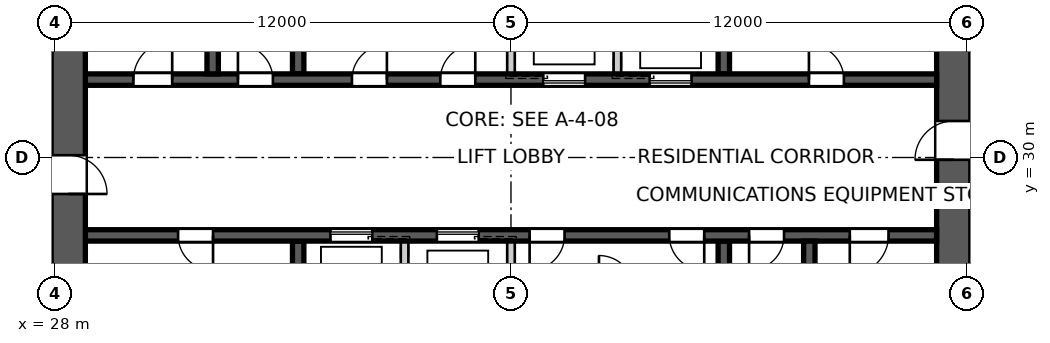
"""IFC4 building model, lengths in metres.
Left out: names, types, materials, properties, quantities, classifications, styles, units other than length and angle.
Written with IfcOpenShell. Run it as: python <this file> out.ifc"""

import sys

from ifc_helpers import new_model, si_unit, direction, frame, frame_2d, origin, place, context, subcontext, project, spatial, polyline, rectangle, outline, extrude, element, fill, save


model = new_model("IFC4")
c1 = context("Model", 3, precision=1e-05, world=origin(), true_north=direction((0.0, 1.0)))
c2 = subcontext(c1, "Body", "Model", "MODEL_VIEW")
j1 = project(units=[si_unit("LENGTHUNIT", "METRE"), si_unit("PLANEANGLEUNIT", "RADIAN")], contexts=[c1])
p1 = place(None, origin())
s1 = spatial("IfcSite", under=j1, at=p1, CompositionType="ELEMENT")
p2 = place(p1, origin())
s2 = spatial("IfcBuilding", under=s1, at=p2, CompositionType="ELEMENT")
p3 = place(p2, frame((0.0, 0.0, 247.2)))
s3 = spatial("IfcBuildingStorey", under=s2, at=p3, CompositionType="ELEMENT", Elevation=247.2)
p4 = place(p3, frame((51.65, 18.8, 0.0), z_axis=(0.0, 0.0, 1.0), x_axis=(0.0, 1.0, 0.0)))
e1 = element("IfcWall", 1, at=p4, inside=s3, PredefinedType="SHEAR", context=c2, shape_type="SweptSolid", body=[
    extrude(outline(polyline([(0.0, -0.45), (22.4, -0.45), (22.4, -0.025), (22.85, -0.025), (22.85, 0.025), (22.4, 0.025), (22.4, 0.45), (0.0, 0.45), (0.0, 0.025), (-0.45, 0.025), (-0.45, -0.025), (0.0, -0.025), (0.0, -0.45)])), origin(), (0.0, 0.0, 1.0), 3.4),
])
p5 = place(p4, frame((11.14, 0.0, 0.0)))
e2 = element("IfcOpeningElement", 2, at=p5, cuts=e1, PredefinedType="OPENING", context=c2, shape_type="SweptSolid", body=[
    extrude(rectangle(XDim=1.02, YDim=2.4, at=frame_2d((0.51, 1.2))), frame((0.0, 0.46, 0.0), z_axis=(0.0, -1.0, 0.0), x_axis=(1.0, 0.0, 0.0)), (0.0, 0.0, 1.0), 0.92),
])
p6 = place(p3, frame((28.35, 41.2, 0.0), z_axis=(0.0, 0.0, 1.0), x_axis=(0.0, -1.0, 0.0)))
e3 = element("IfcWall", 3, at=p6, inside=s3, PredefinedType="SHEAR", context=c2, shape_type="SweptSolid", body=[
    extrude(outline(polyline([(0.0, -0.45), (22.4, -0.45), (22.4, -0.025), (22.85, -0.025), (22.85, 0.025), (22.4, 0.025), (22.4, 0.45), (0.0, 0.45), (0.0, 0.025), (-0.45, 0.025), (-0.45, -0.025), (0.0, -0.025), (0.0, -0.45)])), origin(), (0.0, 0.0, 1.0), 3.4),
])
p7 = place(p6, frame((11.14, 0.0, 0.0)))
e4 = element("IfcOpeningElement", 4, at=p7, cuts=e3, PredefinedType="OPENING", context=c2, shape_type="SweptSolid", body=[
    extrude(rectangle(XDim=1.02, YDim=2.4, at=frame_2d((0.51, 1.2))), frame((0.0, 0.46, 0.0), z_axis=(0.0, -1.0, 0.0), x_axis=(1.0, 0.0, 0.0)), (0.0, 0.0, 1.0), 0.92),
])
p8 = place(p3, frame((28.8, 32.05, 0.0), z_axis=(0.0, 0.0, 1.0), x_axis=(1.0, 0.0, 0.0)))
e5 = element("IfcWall", 5, at=p8, inside=s3, PredefinedType="SHEAR", context=c2, shape_type="SweptSolid", body=[
    extrude(rectangle(XDim=22.4, YDim=0.3, at=frame_2d((11.2, 0.0))), origin(), (0.0, 0.0, 1.0), 3.4),
])
p9 = place(p8, frame((19.04, 0.0, 0.0)))
e6 = element("IfcOpeningElement", 6, at=p9, cuts=e5, PredefinedType="OPENING", context=c2, shape_type="SweptSolid", body=[
    extrude(rectangle(XDim=0.92, YDim=2.1, at=frame_2d((0.46, 1.05))), frame((0.0, 0.16, 0.0), z_axis=(0.0, -1.0, 0.0), x_axis=(1.0, 0.0, 0.0)), (0.0, 0.0, 1.0), 0.32),
])
p10 = place(p8, frame((1.265, 0.0, 0.0)))
e7 = element("IfcOpeningElement", 7, at=p10, cuts=e5, PredefinedType="OPENING", context=c2, shape_type="SweptSolid", body=[
    extrude(rectangle(XDim=1.02, YDim=2.1, at=frame_2d((0.51, 1.05))), frame((0.0, 0.16, 0.0), z_axis=(0.0, -1.0, 0.0), x_axis=(1.0, 0.0, 0.0)), (0.0, 0.0, 1.0), 0.32),
])
p11 = place(p8, frame((4.015, 0.0, 0.0)))
e8 = element("IfcOpeningElement", 8, at=p11, cuts=e5, PredefinedType="OPENING", context=c2, shape_type="SweptSolid", body=[
    extrude(rectangle(XDim=0.92, YDim=2.1, at=frame_2d((0.46, 1.05))), frame((0.0, 0.16, 0.0), z_axis=(0.0, -1.0, 0.0), x_axis=(1.0, 0.0, 0.0)), (0.0, 0.0, 1.0), 0.32),
])
p12 = place(p8, frame((7.015, 0.0, 0.0)))
e9 = element("IfcOpeningElement", 9, at=p12, cuts=e5, PredefinedType="OPENING", context=c2, shape_type="SweptSolid", body=[
    extrude(rectangle(XDim=0.92, YDim=2.1, at=frame_2d((0.46, 1.05))), frame((0.0, 0.16, 0.0), z_axis=(0.0, -1.0, 0.0), x_axis=(1.0, 0.0, 0.0)), (0.0, 0.0, 1.0), 0.32),
])
p13 = place(p8, frame((9.34, 0.0, 0.0)))
e10 = element("IfcOpeningElement", 10, at=p13, cuts=e5, PredefinedType="OPENING", context=c2, shape_type="SweptSolid", body=[
    extrude(rectangle(XDim=0.92, YDim=2.1, at=frame_2d((0.46, 1.05))), frame((0.0, 0.16, 0.0), z_axis=(0.0, -1.0, 0.0), x_axis=(1.0, 0.0, 0.0)), (0.0, 0.0, 1.0), 0.32),
])
p14 = place(p8, frame((12.05, 0.0, 0.0)))
e11 = element("IfcOpeningElement", 11, at=p14, cuts=e5, PredefinedType="OPENING", context=c2, shape_type="SweptSolid", body=[
    extrude(rectangle(XDim=1.1, YDim=2.1, at=frame_2d((0.55, 1.05))), frame((0.0, 0.16, 0.0), z_axis=(0.0, -1.0, 0.0), x_axis=(1.0, 0.0, 0.0)), (0.0, 0.0, 1.0), 0.32),
])
p15 = place(p8, frame((14.85, 0.0, 0.0)))
e12 = element("IfcOpeningElement", 12, at=p15, cuts=e5, PredefinedType="OPENING", context=c2, shape_type="SweptSolid", body=[
    extrude(rectangle(XDim=1.1, YDim=2.1, at=frame_2d((0.55, 1.05))), frame((0.0, 0.16, 0.0), z_axis=(0.0, -1.0, 0.0), x_axis=(1.0, 0.0, 0.0)), (0.0, 0.0, 1.0), 0.32),
])
p16 = place(p3, frame((51.2, 27.95, 0.0), z_axis=(0.0, 0.0, 1.0), x_axis=(-1.0, 0.0, 0.0)))
e13 = element("IfcWall", 13, at=p16, inside=s3, PredefinedType="SHEAR", context=c2, shape_type="SweptSolid", body=[
    extrude(rectangle(XDim=22.4, YDim=0.3, at=frame_2d((11.2, 0.0))), origin(), (0.0, 0.0, 1.0), 3.4),
])
p17 = place(p16, frame((19.04, 0.0, 0.0)))
e14 = element("IfcOpeningElement", 14, at=p17, cuts=e13, PredefinedType="OPENING", context=c2, shape_type="SweptSolid", body=[
    extrude(rectangle(XDim=0.92, YDim=2.1, at=frame_2d((0.46, 1.05))), frame((0.0, 0.16, 0.0), z_axis=(0.0, -1.0, 0.0), x_axis=(1.0, 0.0, 0.0)), (0.0, 0.0, 1.0), 0.32),
])
p18 = place(p16, frame((1.265, 0.0, 0.0)))
e15 = element("IfcOpeningElement", 15, at=p18, cuts=e13, PredefinedType="OPENING", context=c2, shape_type="SweptSolid", body=[
    extrude(rectangle(XDim=1.02, YDim=2.1, at=frame_2d((0.51, 1.05))), frame((0.0, 0.16, 0.0), z_axis=(0.0, -1.0, 0.0), x_axis=(1.0, 0.0, 0.0)), (0.0, 0.0, 1.0), 0.32),
])
p19 = place(p16, frame((4.015, 0.0, 0.0)))
e16 = element("IfcOpeningElement", 16, at=p19, cuts=e13, PredefinedType="OPENING", context=c2, shape_type="SweptSolid", body=[
    extrude(rectangle(XDim=0.92, YDim=2.1, at=frame_2d((0.46, 1.05))), frame((0.0, 0.16, 0.0), z_axis=(0.0, -1.0, 0.0), x_axis=(1.0, 0.0, 0.0)), (0.0, 0.0, 1.0), 0.32),
])
p20 = place(p16, frame((9.79, 0.0, 0.0)))
e17 = element("IfcOpeningElement", 17, at=p20, cuts=e13, PredefinedType="OPENING", context=c2, shape_type="SweptSolid", body=[
    extrude(rectangle(XDim=0.92, YDim=2.1, at=frame_2d((0.46, 1.05))), frame((0.0, 0.16, 0.0), z_axis=(0.0, -1.0, 0.0), x_axis=(1.0, 0.0, 0.0)), (0.0, 0.0, 1.0), 0.32),
])
p21 = place(p16, frame((6.115, 0.0, 0.0)))
e18 = element("IfcOpeningElement", 18, at=p21, cuts=e13, PredefinedType="OPENING", context=c2, shape_type="SweptSolid", body=[
    extrude(rectangle(XDim=0.92, YDim=2.1, at=frame_2d((0.46, 1.05))), frame((0.0, 0.16, 0.0), z_axis=(0.0, -1.0, 0.0), x_axis=(1.0, 0.0, 0.0)), (0.0, 0.0, 1.0), 0.32),
])
p22 = place(p16, frame((12.05, 0.0, 0.0)))
e19 = element("IfcOpeningElement", 19, at=p22, cuts=e13, PredefinedType="OPENING", context=c2, shape_type="SweptSolid", body=[
    extrude(rectangle(XDim=1.1, YDim=2.1, at=frame_2d((0.55, 1.05))), frame((0.0, 0.16, 0.0), z_axis=(0.0, -1.0, 0.0), x_axis=(1.0, 0.0, 0.0)), (0.0, 0.0, 1.0), 0.32),
])
p23 = place(p16, frame((14.85, 0.0, 0.0)))
e20 = element("IfcOpeningElement", 20, at=p23, cuts=e13, PredefinedType="OPENING", context=c2, shape_type="SweptSolid", body=[
    extrude(rectangle(XDim=1.1, YDim=2.1, at=frame_2d((0.55, 1.05))), frame((0.0, 0.16, 0.0), z_axis=(0.0, -1.0, 0.0), x_axis=(1.0, 0.0, 0.0)), (0.0, 0.0, 1.0), 0.32),
])
for number, where, z_axis, x_axis in (
    (21, (34.4, 32.2, 0.0), (0.0, 0.0, 1.0), (0.0, 1.0, 0.0)),
    (22, (45.6, 27.8, 0.0), (0.0, 0.0, 1.0), (0.0, -1.0, 0.0)),
):
    element("IfcWall", number, at=place(p3, frame(where, z_axis=z_axis, x_axis=x_axis)), inside=s3, PredefinedType="SHEAR", context=c2, shape_type="SweptSolid", body=[
        extrude(rectangle(XDim=2.8, YDim=0.3, at=frame_2d((1.4, 0.0))), origin(), (0.0, 0.0, 1.0), 3.4),
    ])
for number, where, z_axis, x_axis in (
    (23, (40.0, 32.2, 0.0), (0.0, 0.0, 1.0), (0.0, 1.0, 0.0)),
    (24, (40.0, 27.8, 0.0), (0.0, 0.0, 1.0), (0.0, -1.0, 0.0)),
    (25, (42.8, 32.2, 0.0), (0.0, 0.0, 1.0), (0.0, 1.0, 0.0)),
    (26, (37.2, 27.8, 0.0), (0.0, 0.0, 1.0), (0.0, -1.0, 0.0)),
):
    element("IfcWall", number, at=place(p3, frame(where, z_axis=z_axis, x_axis=x_axis)), inside=s3, PredefinedType="SOLIDWALL", context=c2, shape_type="SweptSolid", body=[
        extrude(rectangle(XDim=2.8, YDim=0.2, at=frame_2d((1.4, 0.0))), origin(), (0.0, 0.0, 1.0), 3.4),
    ])
for number, where, z_axis, x_axis in (
    (27, (45.6, 32.2, 0.0), (0.0, 0.0, 1.0), (0.0, 1.0, 0.0)),
    (28, (34.4, 27.8, 0.0), (0.0, 0.0, 1.0), (0.0, -1.0, 0.0)),
):
    element("IfcWall", number, at=place(p3, frame(where, z_axis=z_axis, x_axis=x_axis)), inside=s3, PredefinedType="SHEAR", context=c2, shape_type="SweptSolid", body=[
        extrude(rectangle(XDim=2.8, YDim=0.3, at=frame_2d((1.4, 0.0))), origin(), (0.0, 0.0, 1.0), 3.4),
    ])
for number, where, z_axis, x_axis in (
    (29, (32.15, 32.2, 0.0), (0.0, 0.0, 1.0), (0.0, 1.0, 0.0)),
    (30, (47.85, 27.8, 0.0), (0.0, 0.0, 1.0), (0.0, -1.0, 0.0)),
):
    element("IfcWall", number, at=place(p3, frame(where, z_axis=z_axis, x_axis=x_axis)), inside=s3, PredefinedType="SHEAR", context=c2, shape_type="SweptSolid", body=[
        extrude(rectangle(XDim=7.7, YDim=0.3, at=frame_2d((3.85, 0.0))), origin(), (0.0, 0.0, 1.0), 3.4),
    ])
p24 = place(p9, origin())
e31 = element("IfcDoor", 31, at=p24, inside=s3, OperationType="SINGLE_SWING_LEFT", PredefinedType="DOOR", context=c2, shape_type="SweptSolid", body=[
    extrude(rectangle(XDim=0.92, YDim=2.1, at=frame_2d((0.46, 1.05))), frame((0.0, 0.025, 0.0), z_axis=(0.0, -1.0, 0.0), x_axis=(1.0, 0.0, 0.0)), (0.0, 0.0, 1.0), 0.05),
])
fill(e6, e31)
p25 = place(p17, origin())
e32 = element("IfcDoor", 32, at=p25, inside=s3, OperationType="SINGLE_SWING_LEFT", PredefinedType="DOOR", context=c2, shape_type="SweptSolid", body=[
    extrude(rectangle(XDim=0.92, YDim=2.1, at=frame_2d((0.46, 1.05))), frame((0.0, 0.025, 0.0), z_axis=(0.0, -1.0, 0.0), x_axis=(1.0, 0.0, 0.0)), (0.0, 0.0, 1.0), 0.05),
])
fill(e14, e32)
p26 = place(p18, origin())
e33 = element("IfcDoor", 33, at=p26, inside=s3, OperationType="SINGLE_SWING_RIGHT", PredefinedType="DOOR", context=c2, shape_type="SweptSolid", body=[
    extrude(rectangle(XDim=1.02, YDim=2.1, at=frame_2d((0.51, 1.05))), frame((0.0, 0.025, 0.0), z_axis=(0.0, -1.0, 0.0), x_axis=(1.0, 0.0, 0.0)), (0.0, 0.0, 1.0), 0.05),
])
fill(e15, e33)
p27 = place(p10, origin())
e34 = element("IfcDoor", 34, at=p27, inside=s3, OperationType="SINGLE_SWING_RIGHT", PredefinedType="DOOR", context=c2, shape_type="SweptSolid", body=[
    extrude(rectangle(XDim=1.02, YDim=2.1, at=frame_2d((0.51, 1.05))), frame((0.0, 0.025, 0.0), z_axis=(0.0, -1.0, 0.0), x_axis=(1.0, 0.0, 0.0)), (0.0, 0.0, 1.0), 0.05),
])
fill(e7, e34)
p28 = place(p11, origin())
e35 = element("IfcDoor", 35, at=p28, inside=s3, OperationType="SINGLE_SWING_LEFT", PredefinedType="DOOR", context=c2, shape_type="SweptSolid", body=[
    extrude(rectangle(XDim=0.92, YDim=2.1, at=frame_2d((0.46, 1.05))), frame((0.0, 0.025, 0.0), z_axis=(0.0, -1.0, 0.0), x_axis=(1.0, 0.0, 0.0)), (0.0, 0.0, 1.0), 0.05),
])
fill(e8, e35)
p29 = place(p19, origin())
e36 = element("IfcDoor", 36, at=p29, inside=s3, OperationType="SINGLE_SWING_RIGHT", PredefinedType="DOOR", context=c2, shape_type="SweptSolid", body=[
    extrude(rectangle(XDim=0.92, YDim=2.1, at=frame_2d((0.46, 1.05))), frame((0.0, 0.025, 0.0), z_axis=(0.0, -1.0, 0.0), x_axis=(1.0, 0.0, 0.0)), (0.0, 0.0, 1.0), 0.05),
])
fill(e16, e36)
p30 = place(p12, origin())
e37 = element("IfcDoor", 37, at=p30, inside=s3, OperationType="SINGLE_SWING_RIGHT", PredefinedType="DOOR", context=c2, shape_type="SweptSolid", body=[
    extrude(rectangle(XDim=0.92, YDim=2.1, at=frame_2d((0.46, 1.05))), frame((0.0, 0.025, 0.0), z_axis=(0.0, -1.0, 0.0), x_axis=(1.0, 0.0, 0.0)), (0.0, 0.0, 1.0), 0.05),
])
fill(e9, e37)
p31 = place(p13, origin())
e38 = element("IfcDoor", 38, at=p31, inside=s3, OperationType="SINGLE_SWING_RIGHT", PredefinedType="DOOR", context=c2, shape_type="SweptSolid", body=[
    extrude(rectangle(XDim=0.92, YDim=2.1, at=frame_2d((0.46, 1.05))), frame((0.0, 0.025, 0.0), z_axis=(0.0, -1.0, 0.0), x_axis=(1.0, 0.0, 0.0)), (0.0, 0.0, 1.0), 0.05),
])
fill(e10, e38)
p32 = place(p20, origin())
e39 = element("IfcDoor", 39, at=p32, inside=s3, OperationType="SINGLE_SWING_RIGHT", PredefinedType="DOOR", context=c2, shape_type="SweptSolid", body=[
    extrude(rectangle(XDim=0.92, YDim=2.1, at=frame_2d((0.46, 1.05))), frame((0.0, 0.025, 0.0), z_axis=(0.0, -1.0, 0.0), x_axis=(1.0, 0.0, 0.0)), (0.0, 0.0, 1.0), 0.05),
])
fill(e17, e39)
p33 = place(p21, origin())
e40 = element("IfcDoor", 40, at=p33, inside=s3, OperationType="SINGLE_SWING_LEFT", PredefinedType="DOOR", context=c2, shape_type="SweptSolid", body=[
    extrude(rectangle(XDim=0.92, YDim=2.1, at=frame_2d((0.46, 1.05))), frame((0.0, 0.025, 0.0), z_axis=(0.0, -1.0, 0.0), x_axis=(1.0, 0.0, 0.0)), (0.0, 0.0, 1.0), 0.05),
])
fill(e18, e40)
p34 = place(p5, origin())
e41 = element("IfcDoor", 41, at=p34, inside=s3, OperationType="SINGLE_SWING_LEFT", PredefinedType="DOOR", context=c2, shape_type="SweptSolid", body=[
    extrude(rectangle(XDim=1.02, YDim=2.4, at=frame_2d((0.51, 1.2))), frame((0.0, 0.025, 0.0), z_axis=(0.0, -1.0, 0.0), x_axis=(1.0, 0.0, 0.0)), (0.0, 0.0, 1.0), 0.05),
])
fill(e2, e41)
p35 = place(p7, origin())
e42 = element("IfcDoor", 42, at=p35, inside=s3, OperationType="SINGLE_SWING_RIGHT", PredefinedType="DOOR", context=c2, shape_type="SweptSolid", body=[
    extrude(rectangle(XDim=1.02, YDim=2.4, at=frame_2d((0.51, 1.2))), frame((0.0, 0.025, 0.0), z_axis=(0.0, -1.0, 0.0), x_axis=(1.0, 0.0, 0.0)), (0.0, 0.0, 1.0), 0.05),
])
fill(e4, e42)
p36 = place(p14, origin())
e43 = element("IfcDoor", 43, at=p36, inside=s3, OperationType="SLIDING_TO_LEFT", PredefinedType="DOOR", context=c2, shape_type="SweptSolid", body=[
    extrude(rectangle(XDim=1.1, YDim=2.1, at=frame_2d((0.55, 1.05))), frame((0.0, 0.025, 0.0), z_axis=(0.0, -1.0, 0.0), x_axis=(1.0, 0.0, 0.0)), (0.0, 0.0, 1.0), 0.05),
])
fill(e11, e43)
p37 = place(p22, origin())
e44 = element("IfcDoor", 44, at=p37, inside=s3, OperationType="SLIDING_TO_LEFT", PredefinedType="DOOR", context=c2, shape_type="SweptSolid", body=[
    extrude(rectangle(XDim=1.1, YDim=2.1, at=frame_2d((0.55, 1.05))), frame((0.0, 0.025, 0.0), z_axis=(0.0, -1.0, 0.0), x_axis=(1.0, 0.0, 0.0)), (0.0, 0.0, 1.0), 0.05),
])
fill(e19, e44)
p38 = place(p15, origin())
e45 = element("IfcDoor", 45, at=p38, inside=s3, OperationType="SLIDING_TO_LEFT", PredefinedType="DOOR", context=c2, shape_type="SweptSolid", body=[
    extrude(rectangle(XDim=1.1, YDim=2.1, at=frame_2d((0.55, 1.05))), frame((0.0, 0.025, 0.0), z_axis=(0.0, -1.0, 0.0), x_axis=(1.0, 0.0, 0.0)), (0.0, 0.0, 1.0), 0.05),
])
fill(e12, e45)
p39 = place(p23, origin())
e46 = element("IfcDoor", 46, at=p39, inside=s3, OperationType="SLIDING_TO_LEFT", PredefinedType="DOOR", context=c2, shape_type="SweptSolid", body=[
    extrude(rectangle(XDim=1.1, YDim=2.1, at=frame_2d((0.55, 1.05))), frame((0.0, 0.025, 0.0), z_axis=(0.0, -1.0, 0.0), x_axis=(1.0, 0.0, 0.0)), (0.0, 0.0, 1.0), 0.05),
])
fill(e20, e46)
save(model, sys.argv[1])
